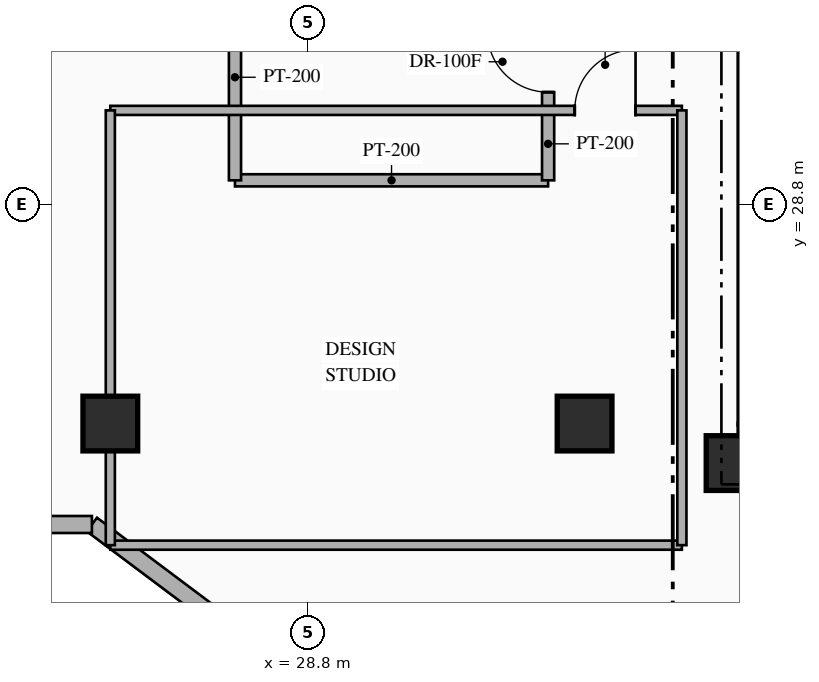
"""IFC4 building model, lengths in metres.
Left out: names, types, materials, properties, quantities, classifications, styles, units other than length and angle.
Written with IfcOpenShell. Run it as: python <this file> out.ifc"""

import sys

from ifc_helpers import new_model, si_unit, direction, frame, frame_2d, origin, origin_2d, place, context, subcontext, project, spatial, rectangle, hollow_rectangle, extrude, element, fill, save


model = new_model("IFC4")
c1 = context("Model", 3, precision=1e-05, world=origin(), true_north=direction((0.0, 1.0)))
c2 = subcontext(c1, "Body", "Model", "MODEL_VIEW")
j1 = project(units=[si_unit("LENGTHUNIT", "METRE"), si_unit("PLANEANGLEUNIT", "RADIAN")], contexts=[c1])
p1 = place(None, origin())
s1 = spatial("IfcSite", under=j1, at=p1, CompositionType="ELEMENT")
p2 = place(p1, origin())
s2 = spatial("IfcBuilding", under=s1, at=p2, CompositionType="ELEMENT")
p3 = place(p2, frame((0.0, 0.0, 115.65)))
s3 = spatial("IfcBuildingStorey", under=s2, at=p3, CompositionType="ELEMENT", Elevation=115.65)
p4 = place(p3, frame((35.89, 24.89, 0.0), z_axis=(0.0, 0.0, 1.0), x_axis=(1.0, 0.0, 0.0)))
e1 = element("IfcWall", 1, at=p4, inside=s3, PredefinedType="SHEAR", context=c2, shape_type="SweptSolid", body=[
    extrude(rectangle(XDim=7.76, YDim=0.6, at=frame_2d((3.88, 0.0))), origin(), (0.0, 0.0, 1.0), 3.6),
])
p5 = place(p3, frame((36.19, 25.19, 0.0), z_axis=(0.0, 0.0, 1.0), x_axis=(0.0, 1.0, 0.0)))
e2 = element("IfcWall", 2, at=p5, inside=s3, PredefinedType="SHEAR", context=c2, shape_type="SweptSolid", body=[
    extrude(rectangle(XDim=9.48, YDim=0.6, at=frame_2d((4.74, 0.0))), origin(), (0.0, 0.0, 1.0), 3.6),
])
p6 = place(p3, frame((35.8, 24.55, 0.0), z_axis=(0.0, 0.0, 1.0), x_axis=(1.0, 0.0, 0.0)))
e3 = element("IfcColumn", 3, at=p6, inside=s3, PredefinedType="COLUMN", context=c2, shape_type="SweptSolid", body=[
    extrude(rectangle(XDim=0.9, YDim=0.9, at=origin_2d()), origin(), (0.0, 0.0, 1.0), 3.6),
])
for number, where, z_axis, x_axis in (
    (4, (25.55, 25.2, 0.0), (0.0, 0.0, 1.0), (1.0, 0.0, 0.0)),
    (5, (33.35, 25.2, 0.0), (0.0, 0.0, 1.0), (1.0, 0.0, 0.0)),
):
    element("IfcColumn", number, at=place(p3, frame(where, z_axis=z_axis, x_axis=x_axis)), inside=s3, PredefinedType="COLUMN", context=c2, shape_type="SweptSolid", body=[
        extrude(hollow_rectangle(XDim=0.9, YDim=0.9, WallThickness=0.036, at=origin_2d()), origin(), (0.0, 0.0, 1.0), 3.6),
    ])
p7 = place(p3, frame((53.318, 2.487, 0.0), z_axis=(0.0, 0.0, 1.0), x_axis=(-0.800004174678, 0.599994433723, 0.0)))
e6 = element("IfcWall", 6, at=p7, inside=s3, PredefinedType="STANDARD", context=c2, shape_type="SweptSolid", body=[
    extrude(rectangle(XDim=35.089, YDim=0.28, at=frame_2d((17.544, 0.0))), origin(), (0.0, 0.0, 1.0), 3.35),
])
p8 = place(p3, frame((25.247, 23.54, 0.0), z_axis=(0.0, 0.0, 1.0), x_axis=(-1.0, 0.0, 0.0)))
e7 = element("IfcWall", 7, at=p8, inside=s3, PredefinedType="STANDARD", context=c2, shape_type="SweptSolid", body=[
    extrude(rectangle(XDim=6.747, YDim=0.28, at=frame_2d((3.374, 0.0))), origin(), (0.0, 0.0, 1.0), 3.35),
])
p9 = place(p3, frame((27.6, 29.2, 0.0), z_axis=(0.0, 0.0, 1.0), x_axis=(1.0, 0.0, 0.0)))
e8 = element("IfcWall", 8, at=p9, inside=s3, PredefinedType="STANDARD", context=c2, shape_type="SweptSolid", body=[
    extrude(rectangle(XDim=5.15, YDim=0.2, at=frame_2d((2.575, 0.0))), origin(), (0.0, 0.0, 1.0), 3.35),
])
p10 = place(p3, frame((27.6, 29.2, 0.0), z_axis=(0.0, 0.0, 1.0), x_axis=(0.0, 1.0, 0.0)))
e9 = element("IfcWall", 9, at=p10, inside=s3, PredefinedType="STANDARD", context=c2, shape_type="SweptSolid", body=[
    extrude(rectangle(XDim=3.39, YDim=0.2, at=frame_2d((1.695, 0.0))), origin(), (0.0, 0.0, 1.0), 3.35),
])
p11 = place(p3, frame((32.75, 29.2, 0.0), z_axis=(0.0, 0.0, 1.0), x_axis=(0.0, 1.0, 0.0)))
e10 = element("IfcWall", 10, at=p11, inside=s3, PredefinedType="STANDARD", context=c2, shape_type="SweptSolid", body=[
    extrude(rectangle(XDim=3.39, YDim=0.2, at=frame_2d((1.695, 0.0))), origin(), (0.0, 0.0, 1.0), 3.35),
])
p12 = place(p11, frame((1.45, 0.0, 0.0)))
e11 = element("IfcOpeningElement", 11, at=p12, cuts=e10, PredefinedType="OPENING", context=c2, shape_type="SweptSolid", body=[
    extrude(rectangle(XDim=1.0, YDim=2.2, at=frame_2d((0.5, 1.1))), frame((0.0, 0.11, 0.0), z_axis=(0.0, -1.0, 0.0), x_axis=(1.0, 0.0, 0.0)), (0.0, 0.0, 1.0), 0.22),
])
p13 = place(p3, frame((25.55, 23.2, 0.0), z_axis=(0.0, 0.0, 1.0), x_axis=(1.0, 0.0, 0.0)))
e12 = element("IfcWall", 12, at=p13, inside=s3, PredefinedType="PARTITIONING", context=c2, shape_type="SweptSolid", body=[
    extrude(rectangle(XDim=9.4, YDim=0.15, at=frame_2d((4.7, 0.0))), origin(), (0.0, 0.0, 1.0), 3.35),
])
p14 = place(p3, frame((25.55, 30.35, 0.0), z_axis=(0.0, 0.0, 1.0), x_axis=(1.0, 0.0, 0.0)))
e13 = element("IfcWall", 13, at=p14, inside=s3, PredefinedType="PARTITIONING", context=c2, shape_type="SweptSolid", body=[
    extrude(rectangle(XDim=9.4, YDim=0.15, at=frame_2d((4.7, 0.0))), origin(), (0.0, 0.0, 1.0), 3.35),
])
p15 = place(p14, frame((7.638, 0.0, 0.0)))
e14 = element("IfcOpeningElement", 14, at=p15, cuts=e13, PredefinedType="OPENING", context=c2, shape_type="SweptSolid", body=[
    extrude(rectangle(XDim=1.0, YDim=2.15, at=frame_2d((0.5, 1.075))), frame((0.0, 0.085, 0.0), z_axis=(0.0, -1.0, 0.0), x_axis=(1.0, 0.0, 0.0)), (0.0, 0.0, 1.0), 0.17),
])
p16 = place(p3, frame((25.55, 23.2, 0.0), z_axis=(0.0, 0.0, 1.0), x_axis=(0.0, 1.0, 0.0)))
e15 = element("IfcWall", 15, at=p16, inside=s3, PredefinedType="PARTITIONING", context=c2, shape_type="SweptSolid", body=[
    extrude(rectangle(XDim=7.15, YDim=0.15, at=frame_2d((3.575, 0.0))), origin(), (0.0, 0.0, 1.0), 2.695),
])
p17 = place(p3, frame((34.95, 23.2, 0.0), z_axis=(0.0, 0.0, 1.0), x_axis=(0.0, 1.0, 0.0)))
e16 = element("IfcWall", 16, at=p17, inside=s3, PredefinedType="PARTITIONING", context=c2, shape_type="SweptSolid", body=[
    extrude(rectangle(XDim=7.15, YDim=0.15, at=frame_2d((3.575, 0.0))), origin(), (0.0, 0.0, 1.0), 3.35),
])
p18 = place(p12, origin())
e17 = element("IfcDoor", 17, at=p18, inside=s3, OperationType="SINGLE_SWING_RIGHT", PredefinedType="DOOR", context=c2, shape_type="SweptSolid", body=[
    extrude(rectangle(XDim=1.0, YDim=2.2, at=frame_2d((0.5, 1.1))), frame((0.0, 0.025, 0.0), z_axis=(0.0, -1.0, 0.0), x_axis=(1.0, 0.0, 0.0)), (0.0, 0.0, 1.0), 0.05),
])
fill(e11, e17)
p19 = place(p15, origin())
e18 = element("IfcDoor", 18, at=p19, inside=s3, OperationType="SINGLE_SWING_RIGHT", PredefinedType="DOOR", context=c2, shape_type="SweptSolid", body=[
    extrude(rectangle(XDim=1.0, YDim=2.15, at=frame_2d((0.5, 1.075))), frame((0.0, 0.025, 0.0), z_axis=(0.0, -1.0, 0.0), x_axis=(1.0, 0.0, 0.0)), (0.0, 0.0, 1.0), 0.05),
])
fill(e14, e18)
save(model, sys.argv[1])
